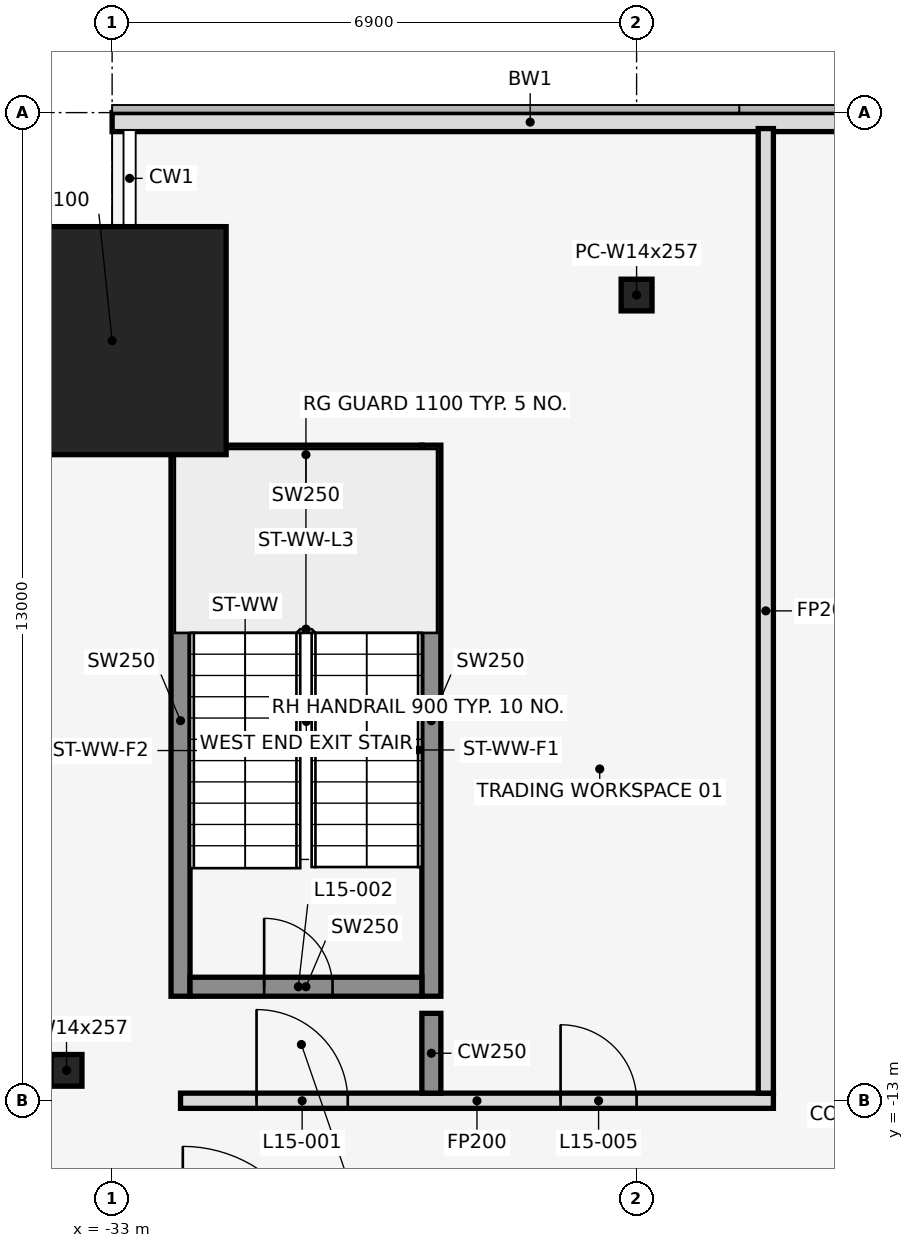
"""IFC4 building model, lengths in metres.
Left out: names, types, materials, properties, quantities, classifications, styles, units other than length and angle.
Written with IfcOpenShell. Run it as: python <this file> out.ifc"""

import sys

from ifc_helpers import new_model, si_unit, direction, frame, frame_2d, origin, origin_2d, place, context, subcontext, project, spatial, rectangle, hollow_rectangle, i_section, extrude, element, fill, save


model = new_model("IFC4")
c1 = context("Model", 3, precision=1e-05, world=origin(), true_north=direction((0.0, 1.0)))
c2 = subcontext(c1, "Body", "Model", "MODEL_VIEW")
j1 = project(units=[si_unit("LENGTHUNIT", "METRE"), si_unit("PLANEANGLEUNIT", "RADIAN")], contexts=[c1])
p1 = place(None, origin())
s1 = spatial("IfcSite", under=j1, at=p1, CompositionType="ELEMENT")
p2 = place(p1, origin())
s2 = spatial("IfcBuilding", under=s1, at=p2, CompositionType="ELEMENT")
p3 = place(p2, frame((0.0, 0.0, 75.5)))
s3 = spatial("IfcBuildingStorey", under=s2, at=p3, CompositionType="ELEMENT", Elevation=75.5)
p4 = place(p3, frame((-33.0, -3.0, 0.0), z_axis=(0.0, 0.0, 1.0), x_axis=(1.0, 0.0, 0.0)))
e1 = element("IfcColumn", 1, at=p4, inside=s3, PredefinedType="COLUMN", context=c2, shape_type="SweptSolid", body=[
    extrude(hollow_rectangle(XDim=3.0, YDim=3.0, WallThickness=0.1, at=origin_2d()), origin(), (0.0, 0.0, 1.0), 4.5),
])
for number, where, z_axis, x_axis in (
    (2, (-26.1, -2.4, 0.0), (0.0, 0.0, 1.0), (1.0, 0.0, 0.0)),
    (3, (-33.6, -12.6, 0.0), (0.0, 0.0, 1.0), (1.0, 0.0, 0.0)),
):
    element("IfcColumn", number, at=place(p3, frame(where, z_axis=z_axis, x_axis=x_axis)), inside=s3, PredefinedType="COLUMN", context=c2, shape_type="SweptSolid", body=[
        extrude(i_section(OverallWidth=0.406, OverallDepth=0.417, WebThickness=0.03, FlangeThickness=0.048, at=origin_2d()), origin(), (0.0, 0.0, 1.0), 4.5),
    ])
p5 = place(p3, frame((-22.0, -0.125, 0.0), z_axis=(0.0, 0.0, 1.0), x_axis=(-1.0, 0.0, 0.0)))
e4 = element("IfcWall", 4, at=p5, inside=s3, PredefinedType="STANDARD", context=c2, shape_type="SweptSolid", body=[
    extrude(rectangle(XDim=11.0, YDim=0.25, at=frame_2d((5.5, 0.0))), origin(), (0.0, 0.0, 1.0), 4.35),
])
for number, where, z_axis, x_axis in (
    (5, (-32.1, -11.625, 0.0), (0.0, 0.0, 1.0), (0.0, 1.0, 0.0)),
    (6, (-28.8, -11.625, 0.0), (0.0, 0.0, 1.0), (0.0, 1.0, 0.0)),
):
    element("IfcWall", number, at=place(p3, frame(where, z_axis=z_axis, x_axis=x_axis)), inside=s3, PredefinedType="SHEAR", context=c2, shape_type="SweptSolid", body=[
        extrude(rectangle(XDim=7.25, YDim=0.25, at=frame_2d((3.625, 0.0))), origin(), (0.0, 0.0, 1.0), 4.5),
    ])
p6 = place(p3, frame((-31.975, -11.5, 0.0), z_axis=(0.0, 0.0, 1.0), x_axis=(1.0, 0.0, 0.0)))
e7 = element("IfcWall", 7, at=p6, inside=s3, PredefinedType="SHEAR", context=c2, shape_type="SweptSolid", body=[
    extrude(rectangle(XDim=3.05, YDim=0.25, at=frame_2d((1.525, 0.0))), origin(), (0.0, 0.0, 1.0), 4.5),
])
p7 = place(p6, frame((0.975, 0.0, 0.0)))
e8 = element("IfcOpeningElement", 8, at=p7, cuts=e7, PredefinedType="OPENING", context=c2, shape_type="SweptSolid", body=[
    extrude(rectangle(XDim=0.9, YDim=2.1, at=frame_2d((0.45, 1.05))), frame((0.0, 0.137, 0.0), z_axis=(0.0, -1.0, 0.0), x_axis=(1.0, 0.0, 0.0)), (0.0, 0.0, 1.0), 0.274),
])
p8 = place(p3, frame((-31.975, -4.5, 0.0), z_axis=(0.0, 0.0, 1.0), x_axis=(1.0, 0.0, 0.0)))
e9 = element("IfcWall", 9, at=p8, inside=s3, PredefinedType="SHEAR", context=c2, shape_type="SweptSolid", body=[
    extrude(rectangle(XDim=3.05, YDim=0.25, at=frame_2d((1.525, 0.0))), origin(), (0.0, 0.0, 1.0), 4.5),
])
p9 = place(p3, frame((-32.1, -13.0, 0.0), z_axis=(0.0, 0.0, 1.0), x_axis=(1.0, 0.0, 0.0)))
e10 = element("IfcWall", 10, at=p9, inside=s3, PredefinedType="PARTITIONING", context=c2, shape_type="SweptSolid", body=[
    extrude(rectangle(XDim=7.8, YDim=0.2, at=frame_2d((3.9, 0.0))), origin(), (0.0, 0.0, 1.0), 3.339),
])
p10 = place(p9, frame((1.0, 0.0, 0.0)))
e11 = element("IfcOpeningElement", 11, at=p10, cuts=e10, PredefinedType="OPENING", context=c2, shape_type="SweptSolid", body=[
    extrude(rectangle(XDim=1.2, YDim=2.1, at=frame_2d((0.6, 1.05))), frame((0.0, 0.112, 0.0), z_axis=(0.0, -1.0, 0.0), x_axis=(1.0, 0.0, 0.0)), (0.0, 0.0, 1.0), 0.224),
])
p11 = place(p9, frame((5.0, 0.0, 0.0)))
e12 = element("IfcOpeningElement", 12, at=p11, cuts=e10, PredefinedType="OPENING", context=c2, shape_type="SweptSolid", body=[
    extrude(rectangle(XDim=1.0, YDim=2.1, at=frame_2d((0.5, 1.05))), frame((0.0, 0.112, 0.0), z_axis=(0.0, -1.0, 0.0), x_axis=(1.0, 0.0, 0.0)), (0.0, 0.0, 1.0), 0.224),
])
p12 = place(p3, frame((-28.8, -12.9, 0.0), z_axis=(0.0, 0.0, 1.0), x_axis=(0.0, 1.0, 0.0)))
e13 = element("IfcWall", 13, at=p12, inside=s3, PredefinedType="SHEAR", context=c2, shape_type="SweptSolid", body=[
    extrude(rectangle(XDim=1.05, YDim=0.25, at=frame_2d((0.525, 0.0))), origin(), (0.0, 0.0, 1.0), 4.5),
])
p13 = place(p3, frame((-24.4, -12.9, 0.0), z_axis=(0.0, 0.0, 1.0), x_axis=(0.0, 1.0, 0.0)))
e14 = element("IfcWall", 14, at=p13, inside=s3, PredefinedType="PARTITIONING", context=c2, shape_type="SweptSolid", body=[
    extrude(rectangle(XDim=12.69, YDim=0.2, at=frame_2d((6.345, 0.0))), origin(), (0.0, 0.0, 1.0), 3.339),
])
p14 = place(p10, origin())
e15 = element("IfcDoor", 15, at=p14, inside=s3, OperationType="SINGLE_SWING_LEFT", PredefinedType="DOOR", context=c2, shape_type="SweptSolid", body=[
    extrude(rectangle(XDim=1.2, YDim=2.1, at=frame_2d((0.6, 1.05))), frame((0.0, 0.025, 0.0), z_axis=(0.0, -1.0, 0.0), x_axis=(1.0, 0.0, 0.0)), (0.0, 0.0, 1.0), 0.05),
])
fill(e11, e15)
p15 = place(p7, origin())
e16 = element("IfcDoor", 16, at=p15, inside=s3, OperationType="SINGLE_SWING_LEFT", PredefinedType="DOOR", context=c2, shape_type="SweptSolid", body=[
    extrude(rectangle(XDim=0.9, YDim=2.1, at=frame_2d((0.45, 1.05))), frame((0.0, 0.025, 0.0), z_axis=(0.0, -1.0, 0.0), x_axis=(1.0, 0.0, 0.0)), (0.0, 0.0, 1.0), 0.05),
])
fill(e8, e16)
p16 = place(p11, origin())
e17 = element("IfcDoor", 17, at=p16, inside=s3, OperationType="SINGLE_SWING_LEFT", PredefinedType="DOOR", context=c2, shape_type="SweptSolid", body=[
    extrude(rectangle(XDim=1.0, YDim=2.1, at=frame_2d((0.5, 1.05))), frame((0.0, 0.025, 0.0), z_axis=(0.0, -1.0, 0.0), x_axis=(1.0, 0.0, 0.0)), (0.0, 0.0, 1.0), 0.05),
])
fill(e12, e17)
save(model, sys.argv[1])
